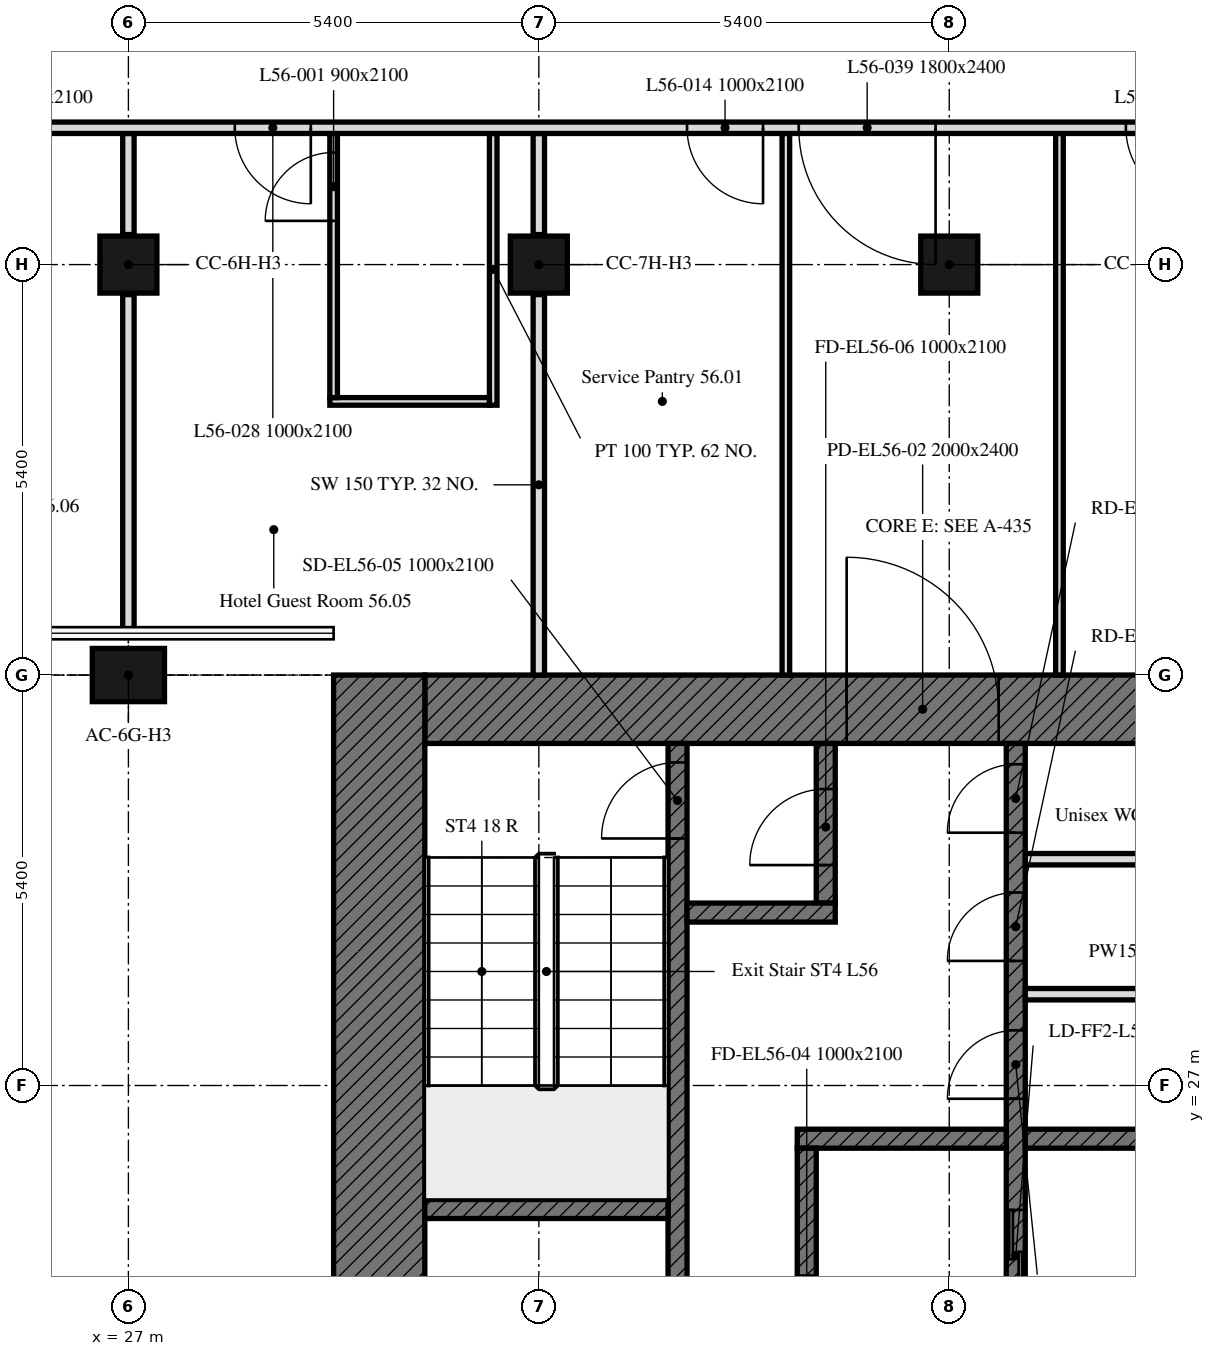
"""IFC4 building model, lengths in metres.
Left out: names, types, materials, properties, quantities, classifications, styles, units other than length and angle.
Written with IfcOpenShell. Run it as: python <this file> out.ifc"""

import sys

from ifc_helpers import new_model, si_unit, direction, frame, frame_2d, origin, origin_2d, place, context, subcontext, project, spatial, rectangle, extrude, element, fill, save


model = new_model("IFC4")
c1 = context("Model", 3, precision=1e-05, world=origin(), true_north=direction((0.0, 1.0)))
c2 = subcontext(c1, "Body", "Model", "MODEL_VIEW")
j1 = project(units=[si_unit("LENGTHUNIT", "METRE"), si_unit("PLANEANGLEUNIT", "RADIAN")], contexts=[c1])
p1 = place(None, origin())
s1 = spatial("IfcSite", under=j1, at=p1, CompositionType="ELEMENT")
p2 = place(p1, origin())
s2 = spatial("IfcBuilding", under=s1, at=p2, CompositionType="ELEMENT")
p3 = place(p2, frame((0.0, 0.0, 223.6)))
s3 = spatial("IfcBuildingStorey", under=s2, at=p3, CompositionType="ELEMENT", Elevation=223.6)
p4 = place(p3, frame((27.0, 32.4, 0.0), z_axis=(0.0, 0.0, 1.0), x_axis=(1.0, 0.0, 0.0)))
e1 = element("IfcColumn", 1, at=p4, inside=s3, PredefinedType="COLUMN", context=c2, shape_type="SweptSolid", body=[
    extrude(rectangle(XDim=0.95, YDim=0.7, at=origin_2d()), origin(), (0.0, 0.0, 1.0), 3.0),
])
for number, where, z_axis, x_axis in (
    (2, (27.0, 37.8, 0.0), (0.0, 0.0, 1.0), (1.0, 0.0, 0.0)),
    (3, (32.4, 37.8, 0.0), (0.0, 0.0, 1.0), (1.0, 0.0, 0.0)),
    (4, (37.8, 37.8, 0.0), (0.0, 0.0, 1.0), (1.0, 0.0, 0.0)),
):
    element("IfcColumn", number, at=place(p3, frame(where, z_axis=z_axis, x_axis=x_axis)), inside=s3, PredefinedType="COLUMN", context=c2, shape_type="SweptSolid", body=[
        extrude(rectangle(XDim=0.75, YDim=0.75, at=origin_2d()), origin(), (0.0, 0.0, 1.0), 3.0),
    ])
p5 = place(p3, frame((30.9, 31.95, 0.0), z_axis=(0.0, 0.0, 1.0), x_axis=(1.0, 0.0, 0.0)))
e5 = element("IfcWall", 5, at=p5, inside=s3, PredefinedType="SOLIDWALL", context=c2, shape_type="SweptSolid", body=[
    extrude(rectangle(XDim=11.1, YDim=0.9, at=frame_2d((5.55, 0.0))), origin(), (0.0, 0.0, 1.0), 3.0),
])
p6 = place(p5, frame((5.55, 0.0, 0.0)))
e6 = element("IfcOpeningElement", 6, at=p6, cuts=e5, PredefinedType="OPENING", context=c2, shape_type="SweptSolid", body=[
    extrude(rectangle(XDim=2.0, YDim=2.4, at=frame_2d((1.0, 1.2))), frame((0.0, 0.45, 0.0), z_axis=(0.0, -1.0, 0.0), x_axis=(1.0, 0.0, 0.0)), (0.0, 0.0, 1.0), 0.9),
])
p7 = place(p3, frame((30.3, 16.2, 0.0), z_axis=(0.0, 0.0, 1.0), x_axis=(0.0, 1.0, 0.0)))
e7 = element("IfcWall", 7, at=p7, inside=s3, PredefinedType="SOLIDWALL", context=c2, shape_type="SweptSolid", body=[
    extrude(rectangle(XDim=16.2, YDim=1.2, at=frame_2d((8.1, 0.0))), origin(), (0.0, 0.0, 1.0), 3.0),
])
p8 = place(p3, frame((38.675, 17.1, 0.0), z_axis=(0.0, 0.0, 1.0), x_axis=(0.0, 1.0, 0.0)))
e8 = element("IfcWall", 8, at=p8, inside=s3, PredefinedType="SOLIDWALL", context=c2, shape_type="SweptSolid", body=[
    extrude(rectangle(XDim=14.4, YDim=0.25, at=frame_2d((7.2, 0.0))), origin(), (0.0, 0.0, 1.0), 3.0),
])
p9 = place(p8, frame((4.6, 0.0, 0.0)))
e9 = element("IfcOpeningElement", 9, at=p9, cuts=e8, PredefinedType="OPENING", context=c2, shape_type="SweptSolid", body=[
    extrude(rectangle(XDim=1.0, YDim=2.1, at=frame_2d((0.5, 1.05))), frame((0.0, 0.125, 0.0), z_axis=(0.0, -1.0, 0.0), x_axis=(1.0, 0.0, 0.0)), (0.0, 0.0, 1.0), 0.25),
])
p10 = place(p8, frame((7.062, 0.0, 0.0)))
e10 = element("IfcOpeningElement", 10, at=p10, cuts=e8, PredefinedType="OPENING", context=c2, shape_type="SweptSolid", body=[
    extrude(rectangle(XDim=1.2, YDim=2.1, at=frame_2d((0.6, 1.05))), frame((0.0, 0.125, 0.0), z_axis=(0.0, -1.0, 0.0), x_axis=(1.0, 0.0, 0.0)), (0.0, 0.0, 1.0), 0.25),
])
p11 = place(p8, frame((9.726, 0.0, 0.0)))
e11 = element("IfcOpeningElement", 11, at=p11, cuts=e8, PredefinedType="OPENING", context=c2, shape_type="SweptSolid", body=[
    extrude(rectangle(XDim=0.9, YDim=2.1, at=frame_2d((0.45, 1.05))), frame((0.0, 0.125, 0.0), z_axis=(0.0, -1.0, 0.0), x_axis=(1.0, 0.0, 0.0)), (0.0, 0.0, 1.0), 0.25),
])
p12 = place(p8, frame((11.539, 0.0, 0.0)))
e12 = element("IfcOpeningElement", 12, at=p12, cuts=e8, PredefinedType="OPENING", context=c2, shape_type="SweptSolid", body=[
    extrude(rectangle(XDim=0.9, YDim=2.1, at=frame_2d((0.45, 1.05))), frame((0.0, 0.125, 0.0), z_axis=(0.0, -1.0, 0.0), x_axis=(1.0, 0.0, 0.0)), (0.0, 0.0, 1.0), 0.25),
])
p13 = place(p8, frame((13.226, 0.0, 0.0)))
e13 = element("IfcOpeningElement", 13, at=p13, cuts=e8, PredefinedType="OPENING", context=c2, shape_type="SweptSolid", body=[
    extrude(rectangle(XDim=0.9, YDim=2.1, at=frame_2d((0.45, 1.05))), frame((0.0, 0.125, 0.0), z_axis=(0.0, -1.0, 0.0), x_axis=(1.0, 0.0, 0.0)), (0.0, 0.0, 1.0), 0.25),
])
p14 = place(p3, frame((34.225, 17.1, 0.0), z_axis=(0.0, 0.0, 1.0), x_axis=(0.0, 1.0, 0.0)))
e14 = element("IfcWall", 14, at=p14, inside=s3, PredefinedType="SOLIDWALL", context=c2, shape_type="SweptSolid", body=[
    extrude(rectangle(XDim=14.4, YDim=0.25, at=frame_2d((7.2, 0.0))), origin(), (0.0, 0.0, 1.0), 3.0),
])
p15 = place(p14, frame((13.15, 0.0, 0.0)))
e15 = element("IfcOpeningElement", 15, at=p15, cuts=e14, PredefinedType="OPENING", context=c2, shape_type="SweptSolid", body=[
    extrude(rectangle(XDim=1.0, YDim=2.1, at=frame_2d((0.5, 1.05))), frame((0.0, 0.125, 0.0), z_axis=(0.0, -1.0, 0.0), x_axis=(1.0, 0.0, 0.0)), (0.0, 0.0, 1.0), 0.25),
])
p16 = place(p14, frame((0.6, 0.0, 0.0)))
e16 = element("IfcOpeningElement", 16, at=p16, cuts=e14, PredefinedType="OPENING", context=c2, shape_type="SweptSolid", body=[
    extrude(rectangle(XDim=1.1, YDim=2.1, at=frame_2d((0.55, 1.05))), frame((0.0, 0.125, 0.0), z_axis=(0.0, -1.0, 0.0), x_axis=(1.0, 0.0, 0.0)), (0.0, 0.0, 1.0), 0.25),
])
p17 = place(p14, frame((3.25, 0.0, 0.0)))
e17 = element("IfcOpeningElement", 17, at=p17, cuts=e14, PredefinedType="OPENING", context=c2, shape_type="SweptSolid", body=[
    extrude(rectangle(XDim=0.9, YDim=2.1, at=frame_2d((0.45, 1.05))), frame((0.0, 0.125, 0.0), z_axis=(0.0, -1.0, 0.0), x_axis=(1.0, 0.0, 0.0)), (0.0, 0.0, 1.0), 0.25),
])
p18 = place(p3, frame((30.9, 25.375, 0.0), z_axis=(0.0, 0.0, 1.0), x_axis=(1.0, 0.0, 0.0)))
e18 = element("IfcWall", 18, at=p18, inside=s3, PredefinedType="SOLIDWALL", context=c2, shape_type="SweptSolid", body=[
    extrude(rectangle(XDim=3.2, YDim=0.25, at=frame_2d((1.6, 0.0))), origin(), (0.0, 0.0, 1.0), 3.0),
])
p19 = place(p3, frame((38.8, 26.3, 0.0), z_axis=(0.0, 0.0, 1.0), x_axis=(1.0, 0.0, 0.0)))
e19 = element("IfcWall", 19, at=p19, inside=s3, PredefinedType="SOLIDWALL", context=c2, shape_type="SweptSolid", body=[
    extrude(rectangle(XDim=3.2, YDim=0.25, at=frame_2d((1.6, 0.0))), origin(), (0.0, 0.0, 1.0), 3.0),
])
p20 = place(p3, frame((35.8, 26.3, 0.0), z_axis=(0.0, 0.0, 1.0), x_axis=(1.0, 0.0, 0.0)))
e20 = element("IfcWall", 20, at=p20, inside=s3, PredefinedType="SOLIDWALL", context=c2, shape_type="SweptSolid", body=[
    extrude(rectangle(XDim=2.75, YDim=0.25, at=frame_2d((1.375, 0.0))), origin(), (0.0, 0.0, 1.0), 3.0),
])
p21 = place(p3, frame((36.175, 29.4, 0.0), z_axis=(0.0, 0.0, 1.0), x_axis=(0.0, 1.0, 0.0)))
e21 = element("IfcWall", 21, at=p21, inside=s3, PredefinedType="SOLIDWALL", context=c2, shape_type="SweptSolid", body=[
    extrude(rectangle(XDim=2.1, YDim=0.25, at=frame_2d((1.05, 0.0))), origin(), (0.0, 0.0, 1.0), 3.0),
])
p22 = place(p21, frame((0.5, 0.0, 0.0)))
e22 = element("IfcOpeningElement", 22, at=p22, cuts=e21, PredefinedType="OPENING", context=c2, shape_type="SweptSolid", body=[
    extrude(rectangle(XDim=1.0, YDim=2.1, at=frame_2d((0.5, 1.05))), frame((0.0, 0.125, 0.0), z_axis=(0.0, -1.0, 0.0), x_axis=(1.0, 0.0, 0.0)), (0.0, 0.0, 1.0), 0.25),
])
p23 = place(p3, frame((34.35, 29.275, 0.0), z_axis=(0.0, 0.0, 1.0), x_axis=(1.0, 0.0, 0.0)))
e23 = element("IfcWall", 23, at=p23, inside=s3, PredefinedType="SOLIDWALL", context=c2, shape_type="SweptSolid", body=[
    extrude(rectangle(XDim=1.95, YDim=0.25, at=frame_2d((0.975, 0.0))), origin(), (0.0, 0.0, 1.0), 3.0),
])
p24 = place(p3, frame((35.925, 20.55, 0.0), z_axis=(0.0, 0.0, 1.0), x_axis=(0.0, 1.0, 0.0)))
e24 = element("IfcWall", 24, at=p24, inside=s3, PredefinedType="SOLIDWALL", context=c2, shape_type="SweptSolid", body=[
    extrude(rectangle(XDim=5.625, YDim=0.25, at=frame_2d((2.812, 0.0))), origin(), (0.0, 0.0, 1.0), 3.0),
])
p25 = place(p24, frame((2.95, 0.0, 0.0)))
e25 = element("IfcOpeningElement", 25, at=p25, cuts=e24, PredefinedType="OPENING", context=c2, shape_type="SweptSolid", body=[
    extrude(rectangle(XDim=1.0, YDim=2.1, at=frame_2d((0.5, 1.05))), frame((0.0, 0.125, 0.0), z_axis=(0.0, -1.0, 0.0), x_axis=(1.0, 0.0, 0.0)), (0.0, 0.0, 1.0), 0.25),
])
for number, where, z_axis, x_axis in (
    (26, (38.8, 28.201, 0.0), (0.0, 0.0, 1.0), (1.0, 0.0, 0.0)),
    (27, (38.8, 29.977, 0.0), (0.0, 0.0, 1.0), (1.0, 0.0, 0.0)),
):
    element("IfcWall", number, at=place(p3, frame(where, z_axis=z_axis, x_axis=x_axis)), inside=s3, PredefinedType="PARTITIONING", context=c2, shape_type="SweptSolid", body=[
        extrude(rectangle(XDim=3.2, YDim=0.15, at=frame_2d((1.6, 0.0))), origin(), (0.0, 0.0, 1.0), 3.0),
    ])
p26 = place(p3, frame((32.4, 32.4, 0.0), z_axis=(0.0, 0.0, 1.0), x_axis=(0.0, 1.0, 0.0)))
e28 = element("IfcWall", 28, at=p26, inside=s3, PredefinedType="PARTITIONING", context=c2, shape_type="SweptSolid", body=[
    extrude(rectangle(XDim=5.005, YDim=0.15, at=frame_2d((2.502, 0.0))), origin(), (0.0, 0.0, 1.0), 2.4),
])
p27 = place(p3, frame((32.4, 38.195, 0.0), z_axis=(0.0, 0.0, 1.0), x_axis=(0.0, 1.0, 0.0)))
e29 = element("IfcWall", 29, at=p27, inside=s3, PredefinedType="PARTITIONING", context=c2, shape_type="SweptSolid", body=[
    extrude(rectangle(XDim=1.33, YDim=0.15, at=frame_2d((0.665, 0.0))), origin(), (0.0, 0.0, 1.0), 2.4),
])
p28 = place(p3, frame((31.8, 39.525, 0.0), z_axis=(0.0, 0.0, 1.0), x_axis=(0.0, -1.0, 0.0)))
e30 = element("IfcWall", 30, at=p28, inside=s3, PredefinedType="PARTITIONING", context=c2, shape_type="SweptSolid", body=[
    extrude(rectangle(XDim=3.575, YDim=0.1, at=frame_2d((1.788, 0.0))), origin(), (0.0, 0.0, 1.0), 3.0),
])
p29 = place(p3, frame((31.75, 36.0, 0.0), z_axis=(0.0, 0.0, 1.0), x_axis=(-1.0, 0.0, 0.0)))
e31 = element("IfcWall", 31, at=p29, inside=s3, PredefinedType="PARTITIONING", context=c2, shape_type="SweptSolid", body=[
    extrude(rectangle(XDim=2.1, YDim=0.1, at=frame_2d((1.05, 0.0))), origin(), (0.0, 0.0, 1.0), 3.0),
])
p30 = place(p3, frame((29.7, 36.05, 0.0), z_axis=(0.0, 0.0, 1.0), x_axis=(0.0, 1.0, 0.0)))
e32 = element("IfcWall", 32, at=p30, inside=s3, PredefinedType="PARTITIONING", context=c2, shape_type="SweptSolid", body=[
    extrude(rectangle(XDim=3.475, YDim=0.1, at=frame_2d((1.737, 0.0))), origin(), (0.0, 0.0, 1.0), 3.0),
])
p31 = place(p30, frame((2.325, 0.0, 0.0)))
e33 = element("IfcOpeningElement", 33, at=p31, cuts=e32, PredefinedType="OPENING", context=c2, shape_type="SweptSolid", body=[
    extrude(rectangle(XDim=0.9, YDim=2.1, at=frame_2d((0.45, 1.05))), frame((0.0, 0.05, 0.0), z_axis=(0.0, -1.0, 0.0), x_axis=(1.0, 0.0, 0.0)), (0.0, 0.0, 1.0), 0.1),
])
p32 = place(p3, frame((27.0, 39.525, 0.0), z_axis=(0.0, 0.0, 1.0), x_axis=(0.0, -1.0, 0.0)))
e34 = element("IfcWall", 34, at=p32, inside=s3, PredefinedType="PARTITIONING", context=c2, shape_type="SweptSolid", body=[
    extrude(rectangle(XDim=1.33, YDim=0.15, at=frame_2d((0.665, 0.0))), origin(), (0.0, 0.0, 1.0), 2.4),
])
p33 = place(p3, frame((27.0, 37.405, 0.0), z_axis=(0.0, 0.0, 1.0), x_axis=(0.0, -1.0, 0.0)))
e35 = element("IfcWall", 35, at=p33, inside=s3, PredefinedType="PARTITIONING", context=c2, shape_type="SweptSolid", body=[
    extrude(rectangle(XDim=4.51, YDim=0.15, at=frame_2d((2.255, 0.0))), origin(), (0.0, 0.0, 1.0), 2.4),
])
for number, where, z_axis, x_axis in (
    (36, (39.25, 32.4, 0.0), (0.0, 0.0, 1.0), (0.0, 1.0, 0.0)),
    (37, (35.65, 39.525, 0.0), (0.0, 0.0, 1.0), (0.0, -1.0, 0.0)),
):
    element("IfcWall", number, at=place(p3, frame(where, z_axis=z_axis, x_axis=x_axis)), inside=s3, PredefinedType="PARTITIONING", context=c2, shape_type="SweptSolid", body=[
        extrude(rectangle(XDim=7.125, YDim=0.1, at=frame_2d((3.562, 0.0))), origin(), (0.0, 0.0, 1.0), 3.0),
    ])
p34 = place(p3, frame((41.374, 39.6, 0.0), z_axis=(0.0, 0.0, 1.0), x_axis=(-1.0, 0.0, 0.0)))
e38 = element("IfcWall", 38, at=p34, inside=s3, PredefinedType="PARTITIONING", context=c2, shape_type="SweptSolid", body=[
    extrude(rectangle(XDim=35.899, YDim=0.15, at=frame_2d((17.949, 0.0))), origin(), (0.0, 0.0, 1.0), 2.4),
])
p35 = place(p34, frame((0.25, 0.0, 0.0)))
e39 = element("IfcOpeningElement", 39, at=p35, cuts=e38, PredefinedType="OPENING", context=c2, shape_type="SweptSolid", body=[
    extrude(rectangle(XDim=1.0, YDim=2.1, at=frame_2d((0.5, 1.05))), frame((0.0, 0.075, 0.0), z_axis=(0.0, -1.0, 0.0), x_axis=(1.0, 0.0, 0.0)), (0.0, 0.0, 1.0), 0.15),
])
p36 = place(p34, frame((27.124, 0.0, 0.0)))
e40 = element("IfcOpeningElement", 40, at=p36, cuts=e38, PredefinedType="OPENING", context=c2, shape_type="SweptSolid", body=[
    extrude(rectangle(XDim=1.0, YDim=2.1, at=frame_2d((0.5, 1.05))), frame((0.0, 0.075, 0.0), z_axis=(0.0, -1.0, 0.0), x_axis=(1.0, 0.0, 0.0)), (0.0, 0.0, 1.0), 0.15),
])
p37 = place(p34, frame((6.024, 0.0, 0.0)))
e41 = element("IfcOpeningElement", 41, at=p37, cuts=e38, PredefinedType="OPENING", context=c2, shape_type="SweptSolid", body=[
    extrude(rectangle(XDim=1.0, YDim=2.1, at=frame_2d((0.5, 1.05))), frame((0.0, 0.075, 0.0), z_axis=(0.0, -1.0, 0.0), x_axis=(1.0, 0.0, 0.0)), (0.0, 0.0, 1.0), 0.15),
])
p38 = place(p34, frame((11.974, 0.0, 0.0)))
e42 = element("IfcOpeningElement", 42, at=p38, cuts=e38, PredefinedType="OPENING", context=c2, shape_type="SweptSolid", body=[
    extrude(rectangle(XDim=1.0, YDim=2.1, at=frame_2d((0.5, 1.05))), frame((0.0, 0.075, 0.0), z_axis=(0.0, -1.0, 0.0), x_axis=(1.0, 0.0, 0.0)), (0.0, 0.0, 1.0), 0.15),
])
p39 = place(p34, frame((15.774, 0.0, 0.0)))
e43 = element("IfcOpeningElement", 43, at=p39, cuts=e38, PredefinedType="OPENING", context=c2, shape_type="SweptSolid", body=[
    extrude(rectangle(XDim=1.0, YDim=2.1, at=frame_2d((0.5, 1.05))), frame((0.0, 0.075, 0.0), z_axis=(0.0, -1.0, 0.0), x_axis=(1.0, 0.0, 0.0)), (0.0, 0.0, 1.0), 0.15),
])
p40 = place(p34, frame((22.774, 0.0, 0.0)))
e44 = element("IfcOpeningElement", 44, at=p40, cuts=e38, PredefinedType="OPENING", context=c2, shape_type="SweptSolid", body=[
    extrude(rectangle(XDim=1.0, YDim=2.1, at=frame_2d((0.5, 1.05))), frame((0.0, 0.075, 0.0), z_axis=(0.0, -1.0, 0.0), x_axis=(1.0, 0.0, 0.0)), (0.0, 0.0, 1.0), 0.15),
])
p41 = place(p34, frame((3.754, 0.0, 0.0)))
e45 = element("IfcOpeningElement", 45, at=p41, cuts=e38, PredefinedType="OPENING", context=c2, shape_type="SweptSolid", body=[
    extrude(rectangle(XDim=1.8, YDim=2.4, at=frame_2d((0.9, 1.2))), frame((0.0, 0.075, 0.0), z_axis=(0.0, -1.0, 0.0), x_axis=(1.0, 0.0, 0.0)), (0.0, 0.0, 1.0), 0.15),
])
p42 = place(p34, frame((29.124, 0.0, 0.0)))
e46 = element("IfcOpeningElement", 46, at=p42, cuts=e38, PredefinedType="OPENING", context=c2, shape_type="SweptSolid", body=[
    extrude(rectangle(XDim=1.0, YDim=2.1, at=frame_2d((0.5, 1.05))), frame((0.0, 0.075, 0.0), z_axis=(0.0, -1.0, 0.0), x_axis=(1.0, 0.0, 0.0)), (0.0, 0.0, 1.0), 0.15),
])
p43 = place(p6, origin())
e47 = element("IfcDoor", 47, at=p43, inside=s3, OperationType="DOUBLE_DOOR_SINGLE_SWING", PredefinedType="DOOR", context=c2, shape_type="SweptSolid", body=[
    extrude(rectangle(XDim=2.0, YDim=2.4, at=frame_2d((1.0, 1.2))), frame((0.0, 0.025, 0.0), z_axis=(0.0, -1.0, 0.0), x_axis=(1.0, 0.0, 0.0)), (0.0, 0.0, 1.0), 0.05),
])
fill(e6, e47)
p44 = place(p15, origin())
e48 = element("IfcDoor", 48, at=p44, inside=s3, OperationType="SINGLE_SWING_LEFT", PredefinedType="DOOR", context=c2, shape_type="SweptSolid", body=[
    extrude(rectangle(XDim=1.0, YDim=2.1, at=frame_2d((0.5, 1.05))), frame((0.0, 0.025, 0.0), z_axis=(0.0, -1.0, 0.0), x_axis=(1.0, 0.0, 0.0)), (0.0, 0.0, 1.0), 0.05),
])
fill(e15, e48)
p45 = place(p22, origin())
e49 = element("IfcDoor", 49, at=p45, inside=s3, OperationType="SINGLE_SWING_LEFT", PredefinedType="DOOR", context=c2, shape_type="SweptSolid", body=[
    extrude(rectangle(XDim=1.0, YDim=2.1, at=frame_2d((0.5, 1.05))), frame((0.0, 0.025, 0.0), z_axis=(0.0, -1.0, 0.0), x_axis=(1.0, 0.0, 0.0)), (0.0, 0.0, 1.0), 0.05),
])
fill(e22, e49)
p46 = place(p10, origin())
e50 = element("IfcDoor", 50, at=p46, inside=s3, OperationType="DOUBLE_DOOR_SLIDING", PredefinedType="DOOR", context=c2, shape_type="SweptSolid", body=[
    extrude(rectangle(XDim=1.2, YDim=2.1, at=frame_2d((0.6, 1.05))), frame((0.0, 0.025, 0.0), z_axis=(0.0, -1.0, 0.0), x_axis=(1.0, 0.0, 0.0)), (0.0, 0.0, 1.0), 0.05),
])
fill(e10, e50)
p47 = place(p11, origin())
e51 = element("IfcDoor", 51, at=p47, inside=s3, OperationType="SINGLE_SWING_LEFT", PredefinedType="DOOR", context=c2, shape_type="SweptSolid", body=[
    extrude(rectangle(XDim=0.9, YDim=2.1, at=frame_2d((0.45, 1.05))), frame((0.0, 0.025, 0.0), z_axis=(0.0, -1.0, 0.0), x_axis=(1.0, 0.0, 0.0)), (0.0, 0.0, 1.0), 0.05),
])
fill(e11, e51)
p48 = place(p12, origin())
e52 = element("IfcDoor", 52, at=p48, inside=s3, OperationType="SINGLE_SWING_LEFT", PredefinedType="DOOR", context=c2, shape_type="SweptSolid", body=[
    extrude(rectangle(XDim=0.9, YDim=2.1, at=frame_2d((0.45, 1.05))), frame((0.0, 0.025, 0.0), z_axis=(0.0, -1.0, 0.0), x_axis=(1.0, 0.0, 0.0)), (0.0, 0.0, 1.0), 0.05),
])
fill(e12, e52)
p49 = place(p13, origin())
e53 = element("IfcDoor", 53, at=p49, inside=s3, OperationType="SINGLE_SWING_LEFT", PredefinedType="DOOR", context=c2, shape_type="SweptSolid", body=[
    extrude(rectangle(XDim=0.9, YDim=2.1, at=frame_2d((0.45, 1.05))), frame((0.0, 0.025, 0.0), z_axis=(0.0, -1.0, 0.0), x_axis=(1.0, 0.0, 0.0)), (0.0, 0.0, 1.0), 0.05),
])
fill(e13, e53)
p50 = place(p31, origin())
e54 = element("IfcDoor", 54, at=p50, inside=s3, OperationType="SINGLE_SWING_RIGHT", PredefinedType="DOOR", context=c2, shape_type="SweptSolid", body=[
    extrude(rectangle(XDim=0.9, YDim=2.1, at=frame_2d((0.45, 1.05))), frame((0.0, 0.025, 0.0), z_axis=(0.0, -1.0, 0.0), x_axis=(1.0, 0.0, 0.0)), (0.0, 0.0, 1.0), 0.05),
])
fill(e33, e54)
p51 = place(p35, origin())
e55 = element("IfcDoor", 55, at=p51, inside=s3, OperationType="SINGLE_SWING_RIGHT", PredefinedType="DOOR", context=c2, shape_type="SweptSolid", body=[
    extrude(rectangle(XDim=1.0, YDim=2.1, at=frame_2d((0.5, 1.05))), frame((0.0, 0.025, 0.0), z_axis=(0.0, -1.0, 0.0), x_axis=(1.0, 0.0, 0.0)), (0.0, 0.0, 1.0), 0.05),
])
fill(e39, e55)
p52 = place(p37, origin())
e56 = element("IfcDoor", 56, at=p52, inside=s3, OperationType="SINGLE_SWING_LEFT", PredefinedType="DOOR", context=c2, shape_type="SweptSolid", body=[
    extrude(rectangle(XDim=1.0, YDim=2.1, at=frame_2d((0.5, 1.05))), frame((0.0, 0.025, 0.0), z_axis=(0.0, -1.0, 0.0), x_axis=(1.0, 0.0, 0.0)), (0.0, 0.0, 1.0), 0.05),
])
fill(e41, e56)
p53 = place(p38, origin())
e57 = element("IfcDoor", 57, at=p53, inside=s3, OperationType="SINGLE_SWING_LEFT", PredefinedType="DOOR", context=c2, shape_type="SweptSolid", body=[
    extrude(rectangle(XDim=1.0, YDim=2.1, at=frame_2d((0.5, 1.05))), frame((0.0, 0.025, 0.0), z_axis=(0.0, -1.0, 0.0), x_axis=(1.0, 0.0, 0.0)), (0.0, 0.0, 1.0), 0.05),
])
fill(e42, e57)
p54 = place(p41, origin())
e58 = element("IfcDoor", 58, at=p54, inside=s3, OperationType="DOUBLE_DOOR_SINGLE_SWING", PredefinedType="DOOR", context=c2, shape_type="SweptSolid", body=[
    extrude(rectangle(XDim=1.8, YDim=2.4, at=frame_2d((0.9, 1.2))), frame((0.0, 0.025, 0.0), z_axis=(0.0, -1.0, 0.0), x_axis=(1.0, 0.0, 0.0)), (0.0, 0.0, 1.0), 0.05),
])
fill(e45, e58)
save(model, sys.argv[1])
